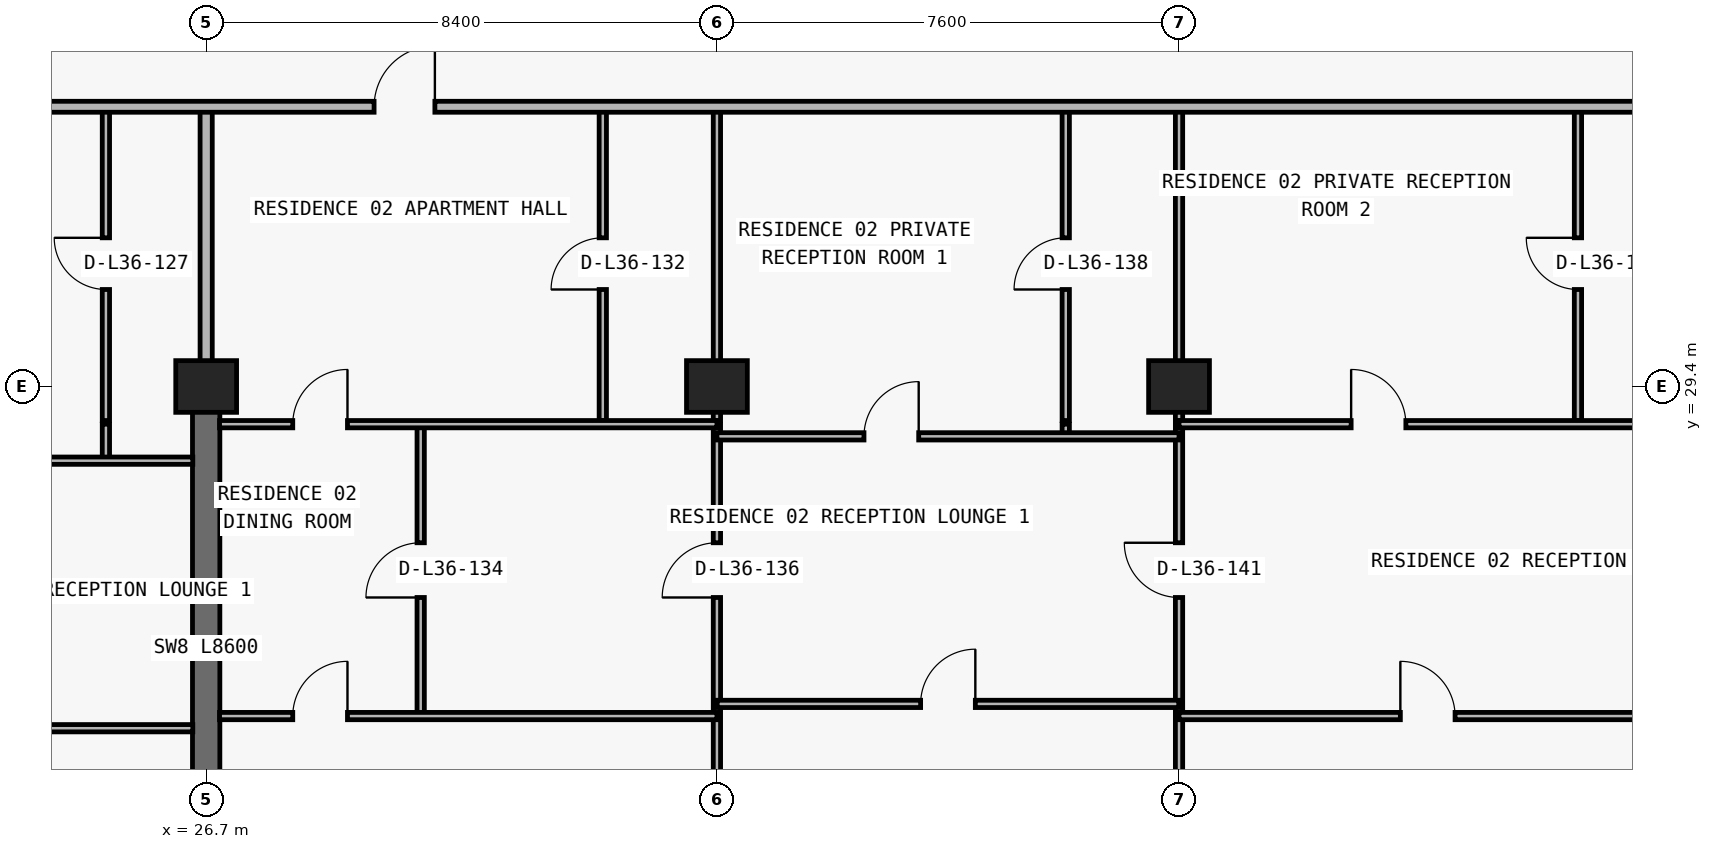
"""IFC4 building model, lengths in metres.
Left out: names, types, materials, properties, quantities, classifications, styles, units other than length and angle.
Written with IfcOpenShell. Run it as: python <this file> out.ifc"""

import sys

from ifc_helpers import new_model, si_unit, direction, frame, frame_2d, origin, origin_2d, place, context, subcontext, project, spatial, rectangle, extrude, element, fill, save


model = new_model("IFC4")
c1 = context("Model", 3, precision=1e-05, world=origin(), true_north=direction((0.0, 1.0)))
c2 = subcontext(c1, "Body", "Model", "MODEL_VIEW")
j1 = project(units=[si_unit("LENGTHUNIT", "METRE"), si_unit("PLANEANGLEUNIT", "RADIAN")], contexts=[c1])
p1 = place(None, origin())
s1 = spatial("IfcSite", under=j1, at=p1, CompositionType="ELEMENT")
p2 = place(p1, origin())
s2 = spatial("IfcBuilding", under=s1, at=p2, CompositionType="ELEMENT")
p3 = place(p2, frame((0.0, 0.0, 132.3)))
s3 = spatial("IfcBuildingStorey", under=s2, at=p3, CompositionType="ELEMENT", Elevation=132.3)
for number, where, z_axis, x_axis in (
    (1, (26.7, 29.4, 0.0), (0.0, 0.0, 1.0), (1.0, 0.0, 0.0)),
    (2, (35.1, 29.4, 0.0), (0.0, 0.0, 1.0), (1.0, 0.0, 0.0)),
    (3, (42.7, 29.4, 0.0), (0.0, 0.0, 1.0), (1.0, 0.0, 0.0)),
):
    element("IfcColumn", number, at=place(p3, frame(where, z_axis=z_axis, x_axis=x_axis)), inside=s3, PredefinedType="COLUMN", context=c2, shape_type="SweptSolid", body=[
        extrude(rectangle(XDim=1.0, YDim=0.85, at=origin_2d()), origin(), (0.0, 0.0, 1.0), 3.05),
    ])
p4 = place(p3, frame((26.7, 20.8, 0.0), z_axis=(0.0, 0.0, 1.0), x_axis=(0.0, 1.0, 0.0)))
e4 = element("IfcWall", 4, at=p4, inside=s3, PredefinedType="SHEAR", context=c2, shape_type="SweptSolid", body=[
    extrude(rectangle(XDim=8.6, YDim=0.45, at=frame_2d((4.3, 0.0))), origin(), (0.0, 0.0, 1.0), 3.05),
])
p5 = place(p3, frame((25.051, 28.18, 0.0), z_axis=(0.0, 0.0, 1.0), x_axis=(0.0, 1.0, 0.0)))
e5 = element("IfcWall", 5, at=p5, inside=s3, PredefinedType="PARTITIONING", context=c2, shape_type="SweptSolid", body=[
    extrude(rectangle(XDim=0.6, YDim=0.12, at=frame_2d((0.3, 0.0))), origin(), (0.0, 0.0, 1.0), 3.05),
])
p6 = place(p3, frame((25.051, 28.84, 0.0), z_axis=(0.0, 0.0, 1.0), x_axis=(0.0, 1.0, 0.0)))
e6 = element("IfcWall", 6, at=p6, inside=s3, PredefinedType="PARTITIONING", context=c2, shape_type="SweptSolid", body=[
    extrude(rectangle(XDim=5.16, YDim=0.12, at=frame_2d((2.58, 0.0))), origin(), (0.0, 0.0, 1.0), 3.05),
])
p7 = place(p6, frame((2.155, 0.0, 0.0)))
e7 = element("IfcOpeningElement", 7, at=p7, cuts=e6, PredefinedType="OPENING", context=c2, shape_type="SweptSolid", body=[
    extrude(rectangle(XDim=0.85, YDim=2.1, at=frame_2d((0.425, 1.05))), frame((0.0, 0.07, 0.0), z_axis=(0.0, -1.0, 0.0), x_axis=(1.0, 0.0, 0.0)), (0.0, 0.0, 1.0), 0.14),
])
p8 = place(p3, frame((26.7, 29.405, 0.0), z_axis=(0.0, 0.0, 1.0), x_axis=(0.0, 1.0, 0.0)))
e8 = element("IfcWall", 8, at=p8, inside=s3, PredefinedType="PARTITIONING", context=c2, shape_type="SweptSolid", body=[
    extrude(rectangle(XDim=4.595, YDim=0.2, at=frame_2d((2.297, 0.0))), origin(), (0.0, 0.0, 1.0), 2.335),
])
p9 = place(p3, frame((30.228, 23.98, 0.0), z_axis=(0.0, 0.0, 1.0), x_axis=(0.0, 1.0, 0.0)))
e9 = element("IfcWall", 9, at=p9, inside=s3, PredefinedType="PARTITIONING", context=c2, shape_type="SweptSolid", body=[
    extrude(rectangle(XDim=4.8, YDim=0.12, at=frame_2d((2.4, 0.0))), origin(), (0.0, 0.0, 1.0), 3.05),
])
p10 = place(p9, frame((1.95, 0.0, 0.0)))
e10 = element("IfcOpeningElement", 10, at=p10, cuts=e9, PredefinedType="OPENING", context=c2, shape_type="SweptSolid", body=[
    extrude(rectangle(XDim=0.9, YDim=2.15, at=frame_2d((0.45, 1.075))), frame((0.0, 0.07, 0.0), z_axis=(0.0, -1.0, 0.0), x_axis=(1.0, 0.0, 0.0)), (0.0, 0.0, 1.0), 0.14),
])
p11 = place(p3, frame((33.223, 28.84, 0.0), z_axis=(0.0, 0.0, 1.0), x_axis=(0.0, 1.0, 0.0)))
e11 = element("IfcWall", 11, at=p11, inside=s3, PredefinedType="PARTITIONING", context=c2, shape_type="SweptSolid", body=[
    extrude(rectangle(XDim=5.16, YDim=0.12, at=frame_2d((2.58, 0.0))), origin(), (0.0, 0.0, 1.0), 3.05),
])
p12 = place(p11, frame((2.155, 0.0, 0.0)))
e12 = element("IfcOpeningElement", 12, at=p12, cuts=e11, PredefinedType="OPENING", context=c2, shape_type="SweptSolid", body=[
    extrude(rectangle(XDim=0.85, YDim=2.1, at=frame_2d((0.425, 1.05))), frame((0.0, 0.07, 0.0), z_axis=(0.0, -1.0, 0.0), x_axis=(1.0, 0.0, 0.0)), (0.0, 0.0, 1.0), 0.14),
])
p13 = place(p3, frame((35.1, 8.84, 0.0), z_axis=(0.0, 0.0, 1.0), x_axis=(0.0, 1.0, 0.0)))
e13 = element("IfcWall", 13, at=p13, inside=s3, PredefinedType="PARTITIONING", context=c2, shape_type="SweptSolid", body=[
    extrude(rectangle(XDim=19.94, YDim=0.12, at=frame_2d((9.97, 0.0))), origin(), (0.0, 0.0, 1.0), 2.174),
])
p14 = place(p13, frame((17.09, 0.0, 0.0)))
e14 = element("IfcOpeningElement", 14, at=p14, cuts=e13, PredefinedType="OPENING", context=c2, shape_type="SweptSolid", body=[
    extrude(rectangle(XDim=0.9, YDim=2.124, at=frame_2d((0.45, 1.062))), frame((0.0, 0.07, 0.0), z_axis=(0.0, -1.0, 0.0), x_axis=(1.0, 0.0, 0.0)), (0.0, 0.0, 1.0), 0.14),
])
p15 = place(p3, frame((35.1, 28.84, 0.0), z_axis=(0.0, 0.0, 1.0), x_axis=(0.0, 1.0, 0.0)))
e15 = element("IfcWall", 15, at=p15, inside=s3, PredefinedType="PARTITIONING", context=c2, shape_type="SweptSolid", body=[
    extrude(rectangle(XDim=5.16, YDim=0.12, at=frame_2d((2.58, 0.0))), origin(), (0.0, 0.0, 1.0), 2.174),
])
p16 = place(p3, frame((40.837, 28.58, 0.0), z_axis=(0.0, 0.0, 1.0), x_axis=(0.0, 1.0, 0.0)))
e16 = element("IfcWall", 16, at=p16, inside=s3, PredefinedType="PARTITIONING", context=c2, shape_type="SweptSolid", body=[
    extrude(rectangle(XDim=0.2, YDim=0.12, at=frame_2d((0.1, 0.0))), origin(), (0.0, 0.0, 1.0), 3.05),
])
p17 = place(p3, frame((40.837, 28.84, 0.0), z_axis=(0.0, 0.0, 1.0), x_axis=(0.0, 1.0, 0.0)))
e17 = element("IfcWall", 17, at=p17, inside=s3, PredefinedType="PARTITIONING", context=c2, shape_type="SweptSolid", body=[
    extrude(rectangle(XDim=5.16, YDim=0.12, at=frame_2d((2.58, 0.0))), origin(), (0.0, 0.0, 1.0), 3.05),
])
p18 = place(p17, frame((2.155, 0.0, 0.0)))
e18 = element("IfcOpeningElement", 18, at=p18, cuts=e17, PredefinedType="OPENING", context=c2, shape_type="SweptSolid", body=[
    extrude(rectangle(XDim=0.85, YDim=2.1, at=frame_2d((0.425, 1.05))), frame((0.0, 0.07, 0.0), z_axis=(0.0, -1.0, 0.0), x_axis=(1.0, 0.0, 0.0)), (0.0, 0.0, 1.0), 0.14),
])
p19 = place(p3, frame((42.7, 8.84, 0.0), z_axis=(0.0, 0.0, 1.0), x_axis=(0.0, 1.0, 0.0)))
e19 = element("IfcWall", 19, at=p19, inside=s3, PredefinedType="PARTITIONING", context=c2, shape_type="SweptSolid", body=[
    extrude(rectangle(XDim=19.94, YDim=0.12, at=frame_2d((9.97, 0.0))), origin(), (0.0, 0.0, 1.0), 2.174),
])
p20 = place(p19, frame((17.09, 0.0, 0.0)))
e20 = element("IfcOpeningElement", 20, at=p20, cuts=e19, PredefinedType="OPENING", context=c2, shape_type="SweptSolid", body=[
    extrude(rectangle(XDim=0.9, YDim=2.124, at=frame_2d((0.45, 1.062))), frame((0.0, 0.07, 0.0), z_axis=(0.0, -1.0, 0.0), x_axis=(1.0, 0.0, 0.0)), (0.0, 0.0, 1.0), 0.14),
])
p21 = place(p3, frame((42.7, 28.84, 0.0), z_axis=(0.0, 0.0, 1.0), x_axis=(0.0, 1.0, 0.0)))
e21 = element("IfcWall", 21, at=p21, inside=s3, PredefinedType="PARTITIONING", context=c2, shape_type="SweptSolid", body=[
    extrude(rectangle(XDim=5.16, YDim=0.12, at=frame_2d((2.58, 0.0))), origin(), (0.0, 0.0, 1.0), 2.174),
])
p22 = place(p3, frame((49.261, 28.84, 0.0), z_axis=(0.0, 0.0, 1.0), x_axis=(0.0, 1.0, 0.0)))
e22 = element("IfcWall", 22, at=p22, inside=s3, PredefinedType="PARTITIONING", context=c2, shape_type="SweptSolid", body=[
    extrude(rectangle(XDim=5.16, YDim=0.12, at=frame_2d((2.58, 0.0))), origin(), (0.0, 0.0, 1.0), 3.05),
])
p23 = place(p22, frame((2.155, 0.0, 0.0)))
e23 = element("IfcOpeningElement", 23, at=p23, cuts=e22, PredefinedType="OPENING", context=c2, shape_type="SweptSolid", body=[
    extrude(rectangle(XDim=0.85, YDim=2.1, at=frame_2d((0.425, 1.05))), frame((0.0, 0.07, 0.0), z_axis=(0.0, -1.0, 0.0), x_axis=(1.0, 0.0, 0.0)), (0.0, 0.0, 1.0), 0.14),
])
p24 = place(p3, frame((18.3, 23.78, 0.0), z_axis=(0.0, 0.0, 1.0), x_axis=(1.0, 0.0, 0.0)))
e24 = element("IfcWall", 24, at=p24, inside=s3, PredefinedType="PARTITIONING", context=c2, shape_type="SweptSolid", body=[
    extrude(rectangle(XDim=8.18, YDim=0.12, at=frame_2d((4.09, 0.0))), origin(), (0.0, 0.0, 1.0), 3.05),
])
p25 = place(p24, frame((3.64, 0.0, 0.0)))
e25 = element("IfcOpeningElement", 25, at=p25, cuts=e24, PredefinedType="OPENING", context=c2, shape_type="SweptSolid", body=[
    extrude(rectangle(XDim=0.9, YDim=2.15, at=frame_2d((0.45, 1.075))), frame((0.0, 0.07, 0.0), z_axis=(0.0, -1.0, 0.0), x_axis=(1.0, 0.0, 0.0)), (0.0, 0.0, 1.0), 0.14),
])
p26 = place(p3, frame((26.92, 23.98, 0.0), z_axis=(0.0, 0.0, 1.0), x_axis=(1.0, 0.0, 0.0)))
e26 = element("IfcWall", 26, at=p26, inside=s3, PredefinedType="PARTITIONING", context=c2, shape_type="SweptSolid", body=[
    extrude(rectangle(XDim=8.18, YDim=0.12, at=frame_2d((4.09, 0.0))), origin(), (0.0, 0.0, 1.0), 3.05),
])
p27 = place(p26, frame((1.204, 0.0, 0.0)))
e27 = element("IfcOpeningElement", 27, at=p27, cuts=e26, PredefinedType="OPENING", context=c2, shape_type="SweptSolid", body=[
    extrude(rectangle(XDim=0.9, YDim=2.15, at=frame_2d((0.45, 1.075))), frame((0.0, 0.07, 0.0), z_axis=(0.0, -1.0, 0.0), x_axis=(1.0, 0.0, 0.0)), (0.0, 0.0, 1.0), 0.14),
])
p28 = place(p3, frame((42.7, 23.98, 0.0), z_axis=(0.0, 0.0, 1.0), x_axis=(1.0, 0.0, 0.0)))
e28 = element("IfcWall", 28, at=p28, inside=s3, PredefinedType="PARTITIONING", context=c2, shape_type="SweptSolid", body=[
    extrude(rectangle(XDim=8.18, YDim=0.12, at=frame_2d((4.09, 0.0))), origin(), (0.0, 0.0, 1.0), 3.05),
])
p29 = place(p28, frame((3.64, 0.0, 0.0)))
e29 = element("IfcOpeningElement", 29, at=p29, cuts=e28, PredefinedType="OPENING", context=c2, shape_type="SweptSolid", body=[
    extrude(rectangle(XDim=0.9, YDim=2.15, at=frame_2d((0.45, 1.075))), frame((0.0, 0.07, 0.0), z_axis=(0.0, -1.0, 0.0), x_axis=(1.0, 0.0, 0.0)), (0.0, 0.0, 1.0), 0.14),
])
p30 = place(p3, frame((35.105, 24.18, 0.0), z_axis=(0.0, 0.0, 1.0), x_axis=(1.0, 0.0, 0.0)))
e30 = element("IfcWall", 30, at=p30, inside=s3, PredefinedType="PARTITIONING", context=c2, shape_type="SweptSolid", body=[
    extrude(rectangle(XDim=7.59, YDim=0.12, at=frame_2d((3.795, 0.0))), origin(), (0.0, 0.0, 1.0), 3.05),
])
p31 = place(p30, frame((3.345, 0.0, 0.0)))
e31 = element("IfcOpeningElement", 31, at=p31, cuts=e30, PredefinedType="OPENING", context=c2, shape_type="SweptSolid", body=[
    extrude(rectangle(XDim=0.9, YDim=2.15, at=frame_2d((0.45, 1.075))), frame((0.0, 0.07, 0.0), z_axis=(0.0, -1.0, 0.0), x_axis=(1.0, 0.0, 0.0)), (0.0, 0.0, 1.0), 0.14),
])
p32 = place(p3, frame((18.3, 28.18, 0.0), z_axis=(0.0, 0.0, 1.0), x_axis=(1.0, 0.0, 0.0)))
e32 = element("IfcWall", 32, at=p32, inside=s3, PredefinedType="PARTITIONING", context=c2, shape_type="SweptSolid", body=[
    extrude(rectangle(XDim=8.18, YDim=0.12, at=frame_2d((4.09, 0.0))), origin(), (0.0, 0.0, 1.0), 3.05),
])
p33 = place(p32, frame((2.926, 0.0, 0.0)))
e33 = element("IfcOpeningElement", 33, at=p33, cuts=e32, PredefinedType="OPENING", context=c2, shape_type="SweptSolid", body=[
    extrude(rectangle(XDim=0.9, YDim=2.15, at=frame_2d((0.45, 1.075))), frame((0.0, 0.07, 0.0), z_axis=(0.0, -1.0, 0.0), x_axis=(1.0, 0.0, 0.0)), (0.0, 0.0, 1.0), 0.14),
])
p34 = place(p3, frame((35.1, 28.58, 0.0), z_axis=(0.0, 0.0, 1.0), x_axis=(1.0, 0.0, 0.0)))
e34 = element("IfcWall", 34, at=p34, inside=s3, PredefinedType="PARTITIONING", context=c2, shape_type="SweptSolid", body=[
    extrude(rectangle(XDim=7.6, YDim=0.12, at=frame_2d((3.8, 0.0))), origin(), (0.0, 0.0, 1.0), 3.05),
])
p35 = place(p34, frame((2.418, 0.0, 0.0)))
e35 = element("IfcOpeningElement", 35, at=p35, cuts=e34, PredefinedType="OPENING", context=c2, shape_type="SweptSolid", body=[
    extrude(rectangle(XDim=0.9, YDim=2.15, at=frame_2d((0.45, 1.075))), frame((0.0, 0.07, 0.0), z_axis=(0.0, -1.0, 0.0), x_axis=(1.0, 0.0, 0.0)), (0.0, 0.0, 1.0), 0.14),
])
p36 = place(p3, frame((26.92, 28.78, 0.0), z_axis=(0.0, 0.0, 1.0), x_axis=(1.0, 0.0, 0.0)))
e36 = element("IfcWall", 36, at=p36, inside=s3, PredefinedType="PARTITIONING", context=c2, shape_type="SweptSolid", body=[
    extrude(rectangle(XDim=8.18, YDim=0.12, at=frame_2d((4.09, 0.0))), origin(), (0.0, 0.0, 1.0), 3.05),
])
p37 = place(p36, frame((1.204, 0.0, 0.0)))
e37 = element("IfcOpeningElement", 37, at=p37, cuts=e36, PredefinedType="OPENING", context=c2, shape_type="SweptSolid", body=[
    extrude(rectangle(XDim=0.9, YDim=2.15, at=frame_2d((0.45, 1.075))), frame((0.0, 0.07, 0.0), z_axis=(0.0, -1.0, 0.0), x_axis=(1.0, 0.0, 0.0)), (0.0, 0.0, 1.0), 0.14),
])
p38 = place(p3, frame((42.7, 28.78, 0.0), z_axis=(0.0, 0.0, 1.0), x_axis=(1.0, 0.0, 0.0)))
e38 = element("IfcWall", 38, at=p38, inside=s3, PredefinedType="PARTITIONING", context=c2, shape_type="SweptSolid", body=[
    extrude(rectangle(XDim=8.18, YDim=0.12, at=frame_2d((4.09, 0.0))), origin(), (0.0, 0.0, 1.0), 3.05),
])
p39 = place(p38, frame((2.831, 0.0, 0.0)))
e39 = element("IfcOpeningElement", 39, at=p39, cuts=e38, PredefinedType="OPENING", context=c2, shape_type="SweptSolid", body=[
    extrude(rectangle(XDim=0.9, YDim=2.15, at=frame_2d((0.45, 1.075))), frame((0.0, 0.07, 0.0), z_axis=(0.0, -1.0, 0.0), x_axis=(1.0, 0.0, 0.0)), (0.0, 0.0, 1.0), 0.14),
])
p40 = place(p3, frame((18.3, 34.0, 0.0), z_axis=(0.0, 0.0, 1.0), x_axis=(1.0, 0.0, 0.0)))
e40 = element("IfcWall", 40, at=p40, inside=s3, PredefinedType="PARTITIONING", context=c2, shape_type="SweptSolid", body=[
    extrude(rectangle(XDim=37.586, YDim=0.18, at=frame_2d((18.793, 0.0))), origin(), (0.0, 0.0, 1.0), 3.05),
])
p41 = place(p40, frame((11.162, 0.0, 0.0)))
e41 = element("IfcOpeningElement", 41, at=p41, cuts=e40, PredefinedType="OPENING", context=c2, shape_type="SweptSolid", body=[
    extrude(rectangle(XDim=1.0, YDim=2.2, at=frame_2d((0.5, 1.1))), frame((0.0, 0.1, 0.0), z_axis=(0.0, -1.0, 0.0), x_axis=(1.0, 0.0, 0.0)), (0.0, 0.0, 1.0), 0.2),
])
p42 = place(p40, frame((34.693, 0.0, 0.0)))
e42 = element("IfcOpeningElement", 42, at=p42, cuts=e40, PredefinedType="OPENING", context=c2, shape_type="SweptSolid", body=[
    extrude(rectangle(XDim=1.0, YDim=2.2, at=frame_2d((0.5, 1.1))), frame((0.0, 0.1, 0.0), z_axis=(0.0, -1.0, 0.0), x_axis=(1.0, 0.0, 0.0)), (0.0, 0.0, 1.0), 0.2),
])
p43 = place(p7, origin())
e43 = element("IfcDoor", 43, at=p43, inside=s3, OperationType="SINGLE_SWING_RIGHT", PredefinedType="DOOR", context=c2, shape_type="SweptSolid", body=[
    extrude(rectangle(XDim=0.85, YDim=2.1, at=frame_2d((0.425, 1.05))), frame((0.0, 0.025, 0.0), z_axis=(0.0, -1.0, 0.0), x_axis=(1.0, 0.0, 0.0)), (0.0, 0.0, 1.0), 0.05),
])
fill(e7, e43)
p44 = place(p41, origin())
e44 = element("IfcDoor", 44, at=p44, inside=s3, OperationType="SINGLE_SWING_RIGHT", PredefinedType="DOOR", context=c2, shape_type="SweptSolid", body=[
    extrude(rectangle(XDim=1.0, YDim=2.2, at=frame_2d((0.5, 1.1))), frame((0.0, 0.025, 0.0), z_axis=(0.0, -1.0, 0.0), x_axis=(1.0, 0.0, 0.0)), (0.0, 0.0, 1.0), 0.05),
])
fill(e41, e44)
p45 = place(p12, origin())
e45 = element("IfcDoor", 45, at=p45, inside=s3, OperationType="SINGLE_SWING_LEFT", PredefinedType="DOOR", context=c2, shape_type="SweptSolid", body=[
    extrude(rectangle(XDim=0.85, YDim=2.1, at=frame_2d((0.425, 1.05))), frame((0.0, 0.025, 0.0), z_axis=(0.0, -1.0, 0.0), x_axis=(1.0, 0.0, 0.0)), (0.0, 0.0, 1.0), 0.05),
])
fill(e12, e45)
p46 = place(p37, origin())
e46 = element("IfcDoor", 46, at=p46, inside=s3, OperationType="SINGLE_SWING_RIGHT", PredefinedType="DOOR", context=c2, shape_type="SweptSolid", body=[
    extrude(rectangle(XDim=0.9, YDim=2.15, at=frame_2d((0.45, 1.075))), frame((0.0, 0.025, 0.0), z_axis=(0.0, -1.0, 0.0), x_axis=(1.0, 0.0, 0.0)), (0.0, 0.0, 1.0), 0.05),
])
fill(e37, e46)
p47 = place(p10, origin())
e47 = element("IfcDoor", 47, at=p47, inside=s3, OperationType="SINGLE_SWING_LEFT", PredefinedType="DOOR", context=c2, shape_type="SweptSolid", body=[
    extrude(rectangle(XDim=0.9, YDim=2.15, at=frame_2d((0.45, 1.075))), frame((0.0, 0.025, 0.0), z_axis=(0.0, -1.0, 0.0), x_axis=(1.0, 0.0, 0.0)), (0.0, 0.0, 1.0), 0.05),
])
fill(e10, e47)
p48 = place(p27, origin())
e48 = element("IfcDoor", 48, at=p48, inside=s3, OperationType="SINGLE_SWING_RIGHT", PredefinedType="DOOR", context=c2, shape_type="SweptSolid", body=[
    extrude(rectangle(XDim=0.9, YDim=2.15, at=frame_2d((0.45, 1.075))), frame((0.0, 0.025, 0.0), z_axis=(0.0, -1.0, 0.0), x_axis=(1.0, 0.0, 0.0)), (0.0, 0.0, 1.0), 0.05),
])
fill(e27, e48)
p49 = place(p14, origin())
e49 = element("IfcDoor", 49, at=p49, inside=s3, OperationType="SINGLE_SWING_LEFT", PredefinedType="DOOR", context=c2, shape_type="SweptSolid", body=[
    extrude(rectangle(XDim=0.9, YDim=2.124, at=frame_2d((0.45, 1.062))), frame((0.0, 0.025, 0.0), z_axis=(0.0, -1.0, 0.0), x_axis=(1.0, 0.0, 0.0)), (0.0, 0.0, 1.0), 0.05),
])
fill(e14, e49)
p50 = place(p35, origin())
e50 = element("IfcDoor", 50, at=p50, inside=s3, OperationType="SINGLE_SWING_RIGHT", PredefinedType="DOOR", context=c2, shape_type="SweptSolid", body=[
    extrude(rectangle(XDim=0.9, YDim=2.15, at=frame_2d((0.45, 1.075))), frame((0.0, 0.025, 0.0), z_axis=(0.0, -1.0, 0.0), x_axis=(1.0, 0.0, 0.0)), (0.0, 0.0, 1.0), 0.05),
])
fill(e35, e50)
p51 = place(p18, origin())
e51 = element("IfcDoor", 51, at=p51, inside=s3, OperationType="SINGLE_SWING_LEFT", PredefinedType="DOOR", context=c2, shape_type="SweptSolid", body=[
    extrude(rectangle(XDim=0.85, YDim=2.1, at=frame_2d((0.425, 1.05))), frame((0.0, 0.025, 0.0), z_axis=(0.0, -1.0, 0.0), x_axis=(1.0, 0.0, 0.0)), (0.0, 0.0, 1.0), 0.05),
])
fill(e18, e51)
p52 = place(p31, origin())
e52 = element("IfcDoor", 52, at=p52, inside=s3, OperationType="SINGLE_SWING_RIGHT", PredefinedType="DOOR", context=c2, shape_type="SweptSolid", body=[
    extrude(rectangle(XDim=0.9, YDim=2.15, at=frame_2d((0.45, 1.075))), frame((0.0, 0.025, 0.0), z_axis=(0.0, -1.0, 0.0), x_axis=(1.0, 0.0, 0.0)), (0.0, 0.0, 1.0), 0.05),
])
fill(e31, e52)
p53 = place(p20, origin())
e53 = element("IfcDoor", 53, at=p53, inside=s3, OperationType="SINGLE_SWING_RIGHT", PredefinedType="DOOR", context=c2, shape_type="SweptSolid", body=[
    extrude(rectangle(XDim=0.9, YDim=2.124, at=frame_2d((0.45, 1.062))), frame((0.0, 0.025, 0.0), z_axis=(0.0, -1.0, 0.0), x_axis=(1.0, 0.0, 0.0)), (0.0, 0.0, 1.0), 0.05),
])
fill(e20, e53)
p54 = place(p39, origin())
e54 = element("IfcDoor", 54, at=p54, inside=s3, OperationType="SINGLE_SWING_LEFT", PredefinedType="DOOR", context=c2, shape_type="SweptSolid", body=[
    extrude(rectangle(XDim=0.9, YDim=2.15, at=frame_2d((0.45, 1.075))), frame((0.0, 0.025, 0.0), z_axis=(0.0, -1.0, 0.0), x_axis=(1.0, 0.0, 0.0)), (0.0, 0.0, 1.0), 0.05),
])
fill(e39, e54)
p55 = place(p23, origin())
e55 = element("IfcDoor", 55, at=p55, inside=s3, OperationType="SINGLE_SWING_RIGHT", PredefinedType="DOOR", context=c2, shape_type="SweptSolid", body=[
    extrude(rectangle(XDim=0.85, YDim=2.1, at=frame_2d((0.425, 1.05))), frame((0.0, 0.025, 0.0), z_axis=(0.0, -1.0, 0.0), x_axis=(1.0, 0.0, 0.0)), (0.0, 0.0, 1.0), 0.05),
])
fill(e23, e55)
p56 = place(p29, origin())
e56 = element("IfcDoor", 56, at=p56, inside=s3, OperationType="SINGLE_SWING_LEFT", PredefinedType="DOOR", context=c2, shape_type="SweptSolid", body=[
    extrude(rectangle(XDim=0.9, YDim=2.15, at=frame_2d((0.45, 1.075))), frame((0.0, 0.025, 0.0), z_axis=(0.0, -1.0, 0.0), x_axis=(1.0, 0.0, 0.0)), (0.0, 0.0, 1.0), 0.05),
])
fill(e29, e56)
save(model, sys.argv[1])
